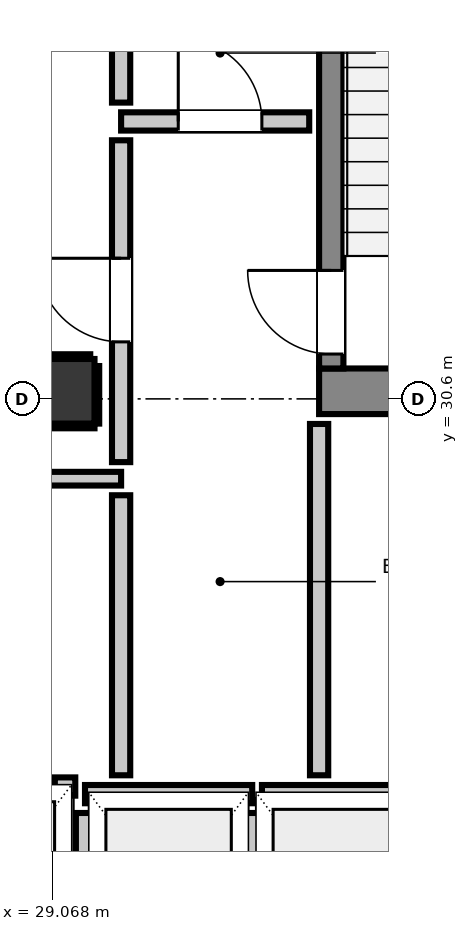
"""IFC4 building model, lengths in metres.
Left out: names, types, materials, properties, quantities, classifications, styles, units other than length and angle.
Written with IfcOpenShell. Run it as: python <this file> out.ifc"""

import sys

from ifc_helpers import new_model, si_unit, direction, frame, frame_2d, origin, origin_2d, place, context, subcontext, project, spatial, rectangle, extrude, element, fill, save


model = new_model("IFC4")
c1 = context("Model", 3, precision=1e-05, world=origin(), true_north=direction((0.0, 1.0)))
c2 = subcontext(c1, "Body", "Model", "MODEL_VIEW")
j1 = project(units=[si_unit("LENGTHUNIT", "METRE"), si_unit("PLANEANGLEUNIT", "RADIAN")], contexts=[c1])
p1 = place(None, origin())
s1 = spatial("IfcSite", under=j1, at=p1, CompositionType="ELEMENT")
p2 = place(p1, origin())
s2 = spatial("IfcBuilding", under=s1, at=p2, CompositionType="ELEMENT")
p3 = place(p2, frame((0.0, 0.0, 237.92)))
s3 = spatial("IfcBuildingStorey", under=s2, at=p3, CompositionType="ELEMENT", Elevation=237.92)
p4 = place(p3, frame((32.58, 30.7, 0.0), z_axis=(0.0, 0.0, 1.0), x_axis=(1.0, 0.0, 0.0)))
e1 = element("IfcWall", 1, at=p4, inside=s3, PredefinedType="SHEAR", context=c2, shape_type="SweptSolid", body=[
    extrude(rectangle(XDim=3.54, YDim=0.6, at=frame_2d((1.77, 0.0))), origin(), (0.0, 0.0, 1.0), 3.32),
])
p5 = place(p3, frame((32.74, 31.0, 0.0), z_axis=(0.0, 0.0, 1.0), x_axis=(0.0, 1.0, 0.0)))
e2 = element("IfcWall", 2, at=p5, inside=s3, PredefinedType="SHEAR", context=c2, shape_type="SweptSolid", body=[
    extrude(rectangle(XDim=7.8, YDim=0.32, at=frame_2d((3.9, 0.0))), origin(), (0.0, 0.0, 1.0), 3.32),
])
p6 = place(p5, frame((0.19, 0.0, 0.0)))
e3 = element("IfcOpeningElement", 3, at=p6, cuts=e2, PredefinedType="OPENING", context=c2, shape_type="SweptSolid", body=[
    extrude(rectangle(XDim=1.1, YDim=2.15, at=frame_2d((0.55, 1.075))), frame((0.0, 0.17, 0.0), z_axis=(0.0, -1.0, 0.0), x_axis=(1.0, 0.0, 0.0)), (0.0, 0.0, 1.0), 0.34),
])
p7 = place(p3, frame((29.2, 30.7, 0.0), z_axis=(0.0, 0.0, 1.0), x_axis=(1.0, 0.0, 0.0)))
e4 = element("IfcColumn", 4, at=p7, inside=s3, PredefinedType="COLUMN", context=c2, shape_type="SweptSolid", body=[
    extrude(rectangle(XDim=0.85, YDim=0.85, at=origin_2d()), origin(), (0.0, 0.0, 1.0), 3.32),
])
p8 = place(p3, frame((29.5, 25.4, 0.0), z_axis=(0.0, 0.0, 1.0), x_axis=(1.0, 0.0, 0.0)))
e5 = element("IfcWall", 5, at=p8, inside=s3, PredefinedType="PARTITIONING", context=c2, shape_type="SweptSolid", body=[
    extrude(rectangle(XDim=2.2, YDim=0.24, at=frame_2d((1.1, 0.0))), origin(), (0.0, 0.0, 1.0), 3.1),
])
p9 = place(p3, frame((29.5, 22.848, 0.0), z_axis=(0.0, 0.0, 1.0), x_axis=(0.0, 1.0, 0.0)))
e6 = element("IfcWall", 6, at=p9, inside=s3, PredefinedType="PARTITIONING", context=c2, shape_type="SweptSolid", body=[
    extrude(rectangle(XDim=2.304, YDim=0.24, at=frame_2d((1.152, 0.0))), origin(), (0.0, 0.0, 1.0), 2.335),
])
p10 = place(p3, frame((31.7, 22.848, 0.0), z_axis=(0.0, 0.0, 1.0), x_axis=(0.0, 1.0, 0.0)))
e7 = element("IfcWall", 7, at=p10, inside=s3, PredefinedType="PARTITIONING", context=c2, shape_type="SweptSolid", body=[
    extrude(rectangle(XDim=2.304, YDim=0.24, at=frame_2d((1.152, 0.0))), origin(), (0.0, 0.0, 1.0), 3.1),
])
p11 = place(p3, frame((31.828, 25.4, 0.0), z_axis=(0.0, 0.0, 1.0), x_axis=(1.0, 0.0, 0.0)))
e8 = element("IfcWall", 8, at=p11, inside=s3, PredefinedType="PARTITIONING", context=c2, shape_type="SweptSolid", body=[
    extrude(rectangle(XDim=2.072, YDim=0.24, at=frame_2d((1.036, 0.0))), origin(), (0.0, 0.0, 1.0), 3.1),
])
p12 = place(p3, frame((29.103, 25.5, 0.0), z_axis=(0.0, 0.0, 1.0), x_axis=(1.0, 0.0, 0.0)))
e9 = element("IfcWall", 9, at=p12, inside=s3, PredefinedType="PARTITIONING", context=c2, shape_type="SweptSolid", body=[
    extrude(rectangle(XDim=0.269, YDim=0.24, at=frame_2d((0.135, 0.0))), origin(), (0.0, 0.0, 1.0), 3.1),
])
p13 = place(p3, frame((29.975, 34.25, 0.0), z_axis=(0.0, 0.0, 1.0), x_axis=(1.0, 0.0, 0.0)))
e10 = element("IfcWall", 10, at=p13, inside=s3, PredefinedType="PARTITIONING", context=c2, shape_type="SweptSolid", body=[
    extrude(rectangle(XDim=2.475, YDim=0.24, at=frame_2d((1.237, 0.0))), origin(), (0.0, 0.0, 1.0), 3.1),
])
p14 = place(p13, frame((0.752, 0.0, 0.0)))
e11 = element("IfcOpeningElement", 11, at=p14, cuts=e10, PredefinedType="OPENING", context=c2, shape_type="SweptSolid", body=[
    extrude(rectangle(XDim=1.1, YDim=2.15, at=frame_2d((0.55, 1.075))), frame((0.0, 0.13, 0.0), z_axis=(0.0, -1.0, 0.0), x_axis=(1.0, 0.0, 0.0)), (0.0, 0.0, 1.0), 0.26),
])
p15 = place(p3, frame((28.593, 29.55, 0.0), z_axis=(0.0, 0.0, 1.0), x_axis=(1.0, 0.0, 0.0)))
e12 = element("IfcWall", 12, at=p15, inside=s3, PredefinedType="PARTITIONING", context=c2, shape_type="SweptSolid", body=[
    extrude(rectangle(XDim=1.382, YDim=0.18, at=frame_2d((0.691, 0.0))), origin(), (0.0, 0.0, 1.0), 3.1),
])
p16 = place(p3, frame((29.975, 25.648, 0.0), z_axis=(0.0, 0.0, 1.0), x_axis=(0.0, 1.0, 0.0)))
e13 = element("IfcWall", 13, at=p16, inside=s3, PredefinedType="PARTITIONING", context=c2, shape_type="SweptSolid", body=[
    extrude(rectangle(XDim=3.684, YDim=0.24, at=frame_2d((1.842, 0.0))), origin(), (0.0, 0.0, 1.0), 3.1),
])
p17 = place(p3, frame((29.975, 29.768, 0.0), z_axis=(0.0, 0.0, 1.0), x_axis=(0.0, 1.0, 0.0)))
e14 = element("IfcWall", 14, at=p17, inside=s3, PredefinedType="PARTITIONING", context=c2, shape_type="SweptSolid", body=[
    extrude(rectangle(XDim=4.234, YDim=0.24, at=frame_2d((2.117, 0.0))), origin(), (0.0, 0.0, 1.0), 3.1),
])
p18 = place(p17, frame((1.582, 0.0, 0.0)))
e15 = element("IfcOpeningElement", 15, at=p18, cuts=e14, PredefinedType="OPENING", context=c2, shape_type="SweptSolid", body=[
    extrude(rectangle(XDim=1.1, YDim=2.15, at=frame_2d((0.55, 1.075))), frame((0.0, 0.13, 0.0), z_axis=(0.0, -1.0, 0.0), x_axis=(1.0, 0.0, 0.0)), (0.0, 0.0, 1.0), 0.26),
])
p19 = place(p3, frame((29.975, 34.498, 0.0), z_axis=(0.0, 0.0, 1.0), x_axis=(0.0, 1.0, 0.0)))
e16 = element("IfcWall", 16, at=p19, inside=s3, PredefinedType="PARTITIONING", context=c2, shape_type="SweptSolid", body=[
    extrude(rectangle(XDim=0.934, YDim=0.24, at=frame_2d((0.467, 0.0))), origin(), (0.0, 0.0, 1.0), 3.1),
])
p20 = place(p3, frame((32.58, 25.648, 0.0), z_axis=(0.0, 0.0, 1.0), x_axis=(0.0, 1.0, 0.0)))
e17 = element("IfcWall", 17, at=p20, inside=s3, PredefinedType="PARTITIONING", context=c2, shape_type="SweptSolid", body=[
    extrude(rectangle(XDim=4.622, YDim=0.24, at=frame_2d((2.311, 0.0))), origin(), (0.0, 0.0, 1.0), 3.1),
])
p21 = place(p3, frame((28.775, 30.243, 0.0), z_axis=(0.0, 0.0, 1.0), x_axis=(1.0, 0.0, 0.0)))
e18 = element("IfcWall", 18, at=p21, inside=s3, PredefinedType="PARTITIONING", context=c2, shape_type="SweptSolid", body=[
    extrude(rectangle(XDim=0.85, YDim=0.06, at=frame_2d((0.425, 0.0))), origin(), (0.0, 0.0, 1.0), 1.45),
])
p22 = place(p3, frame((28.775, 31.157, 0.0), z_axis=(0.0, 0.0, 1.0), x_axis=(1.0, 0.0, 0.0)))
e19 = element("IfcWall", 19, at=p22, inside=s3, PredefinedType="PARTITIONING", context=c2, shape_type="SweptSolid", body=[
    extrude(rectangle(XDim=0.794, YDim=0.06, at=frame_2d((0.397, 0.0))), origin(), (0.0, 0.0, 1.0), 1.45),
])
p23 = place(p3, frame((29.657, 30.275, 0.0), z_axis=(0.0, 0.0, 1.0), x_axis=(0.0, 1.0, 0.0)))
e20 = element("IfcWall", 20, at=p23, inside=s3, PredefinedType="PARTITIONING", context=c2, shape_type="SweptSolid", body=[
    extrude(rectangle(XDim=0.757, YDim=0.06, at=frame_2d((0.378, 0.0))), origin(), (0.0, 0.0, 1.0), 1.45),
])
p24 = place(p6, origin())
e21 = element("IfcDoor", 21, at=p24, inside=s3, OperationType="SINGLE_SWING_RIGHT", PredefinedType="DOOR", context=c2, shape_type="SweptSolid", body=[
    extrude(rectangle(XDim=1.1, YDim=2.15, at=frame_2d((0.55, 1.075))), frame((0.0, 0.025, 0.0), z_axis=(0.0, -1.0, 0.0), x_axis=(1.0, 0.0, 0.0)), (0.0, 0.0, 1.0), 0.05),
])
fill(e3, e21)
p25 = place(p18, origin())
e22 = element("IfcDoor", 22, at=p25, inside=s3, OperationType="SINGLE_SWING_RIGHT", PredefinedType="DOOR", context=c2, shape_type="SweptSolid", body=[
    extrude(rectangle(XDim=1.1, YDim=2.15, at=frame_2d((0.55, 1.075))), frame((0.0, 0.025, 0.0), z_axis=(0.0, -1.0, 0.0), x_axis=(1.0, 0.0, 0.0)), (0.0, 0.0, 1.0), 0.05),
])
fill(e15, e22)
p26 = place(p14, origin())
e23 = element("IfcDoor", 23, at=p26, inside=s3, OperationType="SINGLE_SWING_LEFT", PredefinedType="DOOR", context=c2, shape_type="SweptSolid", body=[
    extrude(rectangle(XDim=1.1, YDim=2.15, at=frame_2d((0.55, 1.075))), frame((0.0, 0.025, 0.0), z_axis=(0.0, -1.0, 0.0), x_axis=(1.0, 0.0, 0.0)), (0.0, 0.0, 1.0), 0.05),
])
fill(e11, e23)
save(model, sys.argv[1])
